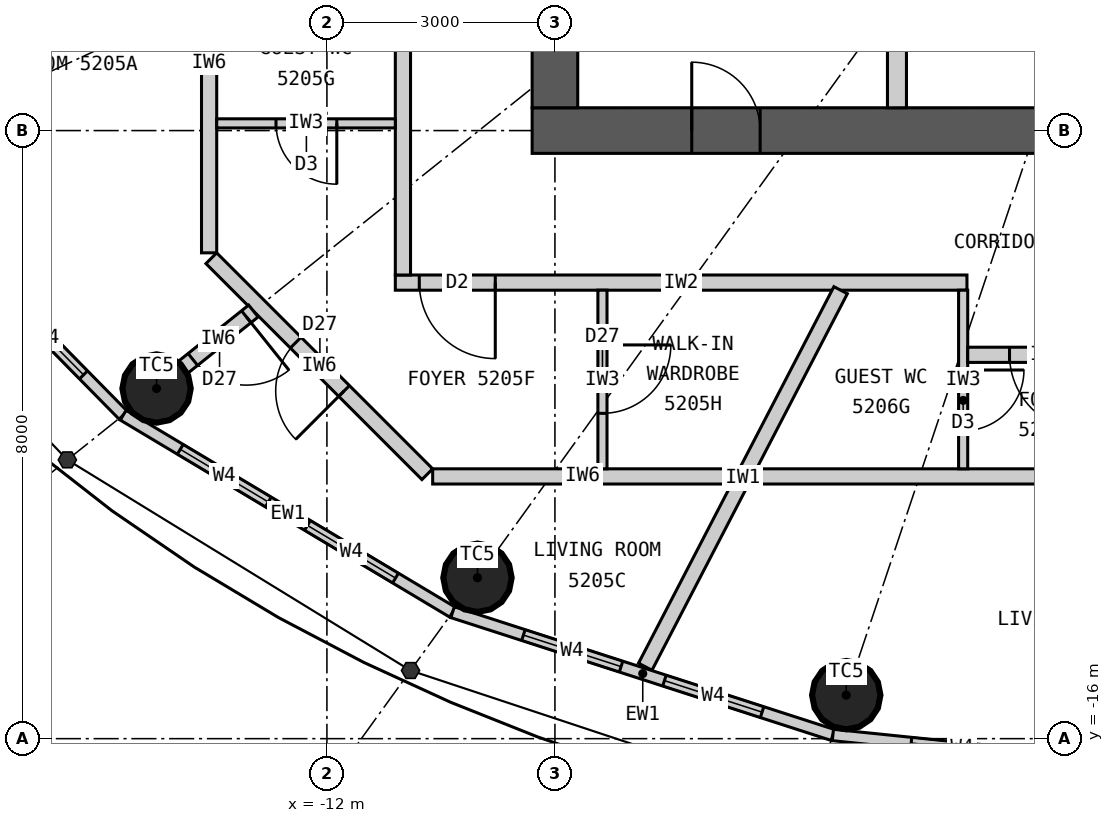
"""IFC4 building model, lengths in metres.
Left out: names, types, materials, properties, quantities, classifications, styles, units other than length and angle.
Written with IfcOpenShell. Run it as: python <this file> out.ifc"""

import sys

from ifc_helpers import new_model, si_unit, direction, frame, frame_2d, origin, origin_2d, place, context, subcontext, project, spatial, rectangle, circle, extrude, element, fill, save


model = new_model("IFC4")
c1 = context("Model", 3, precision=1e-05, world=origin(), true_north=direction((0.0, 1.0)))
c2 = subcontext(c1, "Body", "Model", "MODEL_VIEW")
j1 = project(units=[si_unit("LENGTHUNIT", "METRE"), si_unit("PLANEANGLEUNIT", "RADIAN")], contexts=[c1])
p1 = place(None, origin())
s1 = spatial("IfcSite", under=j1, at=p1, CompositionType="ELEMENT")
p2 = place(p1, origin())
s2 = spatial("IfcBuilding", under=s1, at=p2, CompositionType="ELEMENT")
p3 = place(p2, frame((0.0, 0.0, 196.2)))
s3 = spatial("IfcBuildingStorey", under=s2, at=p3, CompositionType="ELEMENT", Elevation=196.2)
for number, where, z_axis, x_axis in (
    (1, (-14.241, -11.393, 0.0), (0.0, 0.0, 1.0), (1.0, 0.0, 0.0)),
    (2, (-10.019, -13.883, 0.0), (0.0, 0.0, 1.0), (1.0, 0.0, 0.0)),
    (3, (-5.167, -15.427, 0.0), (0.0, 0.0, 1.0), (1.0, 0.0, 0.0)),
):
    element("IfcColumn", number, at=place(p3, frame(where, z_axis=z_axis, x_axis=x_axis)), inside=s3, PredefinedType="COLUMN", context=c2, shape_type="SweptSolid", body=[
        extrude(circle(Radius=0.45, at=origin_2d()), origin(), (0.0, 0.0, 1.0), 3.3),
    ])
p4 = place(p3, frame((9.3, -8.0, 0.0), z_axis=(0.0, 0.0, 1.0), x_axis=(-1.0, 0.0, 0.0)))
e4 = element("IfcWall", 4, at=p4, inside=s3, PredefinedType="SHEAR", context=c2, shape_type="SweptSolid", body=[
    extrude(rectangle(XDim=18.6, YDim=0.6, at=frame_2d((9.3, 0.0))), origin(), (0.0, 0.0, 1.0), 3.3),
])
p5 = place(p4, frame((8.0, 0.0, 0.0)))
e5 = element("IfcOpeningElement", 5, at=p5, cuts=e4, PredefinedType="OPENING", context=c2, shape_type="SweptSolid", body=[
    extrude(rectangle(XDim=1.2, YDim=2.2, at=frame_2d((0.6, 1.1))), frame((0.0, 0.31, 0.0), z_axis=(0.0, -1.0, 0.0), x_axis=(1.0, 0.0, 0.0)), (0.0, 0.0, 1.0), 0.62),
])
p6 = place(p4, frame((15.6, 0.0, 0.0)))
e6 = element("IfcOpeningElement", 6, at=p6, cuts=e4, PredefinedType="OPENING", context=c2, shape_type="SweptSolid", body=[
    extrude(rectangle(XDim=0.9, YDim=2.2, at=frame_2d((0.45, 1.1))), frame((0.0, 0.31, 0.0), z_axis=(0.0, -1.0, 0.0), x_axis=(1.0, 0.0, 0.0)), (0.0, 0.0, 1.0), 0.62),
])
p7 = place(p3, frame((-9.0, 7.7, 0.0), z_axis=(0.0, 0.0, 1.0), x_axis=(0.0, -1.0, 0.0)))
e7 = element("IfcWall", 7, at=p7, inside=s3, PredefinedType="SHEAR", context=c2, shape_type="SweptSolid", body=[
    extrude(rectangle(XDim=15.4, YDim=0.6, at=frame_2d((7.7, 0.0))), origin(), (0.0, 0.0, 1.0), 3.3),
])
p8 = place(p7, frame((6.8, 0.0, 0.0)))
e8 = element("IfcOpeningElement", 8, at=p8, cuts=e7, PredefinedType="OPENING", context=c2, shape_type="SweptSolid", body=[
    extrude(rectangle(XDim=1.8, YDim=2.2, at=frame_2d((0.9, 1.1))), frame((0.0, 0.31, 0.0), z_axis=(0.0, -1.0, 0.0), x_axis=(1.0, 0.0, 0.0)), (0.0, 0.0, 1.0), 0.62),
])
p9 = place(p3, frame((-4.5, -7.7, 0.0), z_axis=(0.0, 0.0, 1.0), x_axis=(0.0, 1.0, 0.0)))
e9 = element("IfcWall", 9, at=p9, inside=s3, PredefinedType="PARTITIONING", context=c2, shape_type="SweptSolid", body=[
    extrude(rectangle(XDim=3.2, YDim=0.25, at=frame_2d((1.6, 0.0))), origin(), (0.0, 0.0, 1.0), 3.3),
])
p10 = place(p3, frame((-18.04, -8.332, 0.0), z_axis=(0.0, 0.0, 1.0), x_axis=(0.701527379618, -0.712642501993, 0.0)))
e10 = element("IfcWall", 10, at=p10, inside=s3, PredefinedType="ELEMENTEDWALL", context=c2, shape_type="SweptSolid", body=[
    extrude(rectangle(XDim=4.788, YDim=0.15, at=frame_2d((2.394, 0.0))), origin(), (0.0, 0.0, 1.0), 3.12),
])
p11 = place(p10, frame((0.744, 0.0, 0.9)))
e11 = element("IfcOpeningElement", 11, at=p11, cuts=e10, PredefinedType="OPENING", context=c2, shape_type="SweptSolid", body=[
    extrude(rectangle(XDim=1.35, YDim=1.9, at=frame_2d((0.675, 0.95))), frame((0.0, 0.085, 0.0), z_axis=(0.0, -1.0, 0.0), x_axis=(1.0, 0.0, 0.0)), (0.0, 0.0, 1.0), 0.17),
])
p12 = place(p10, frame((2.694, 0.0, 0.9)))
e12 = element("IfcOpeningElement", 12, at=p12, cuts=e10, PredefinedType="OPENING", context=c2, shape_type="SweptSolid", body=[
    extrude(rectangle(XDim=1.35, YDim=1.9, at=frame_2d((0.675, 0.95))), frame((0.0, 0.085, 0.0), z_axis=(0.0, -1.0, 0.0), x_axis=(1.0, 0.0, 0.0)), (0.0, 0.0, 1.0), 0.17),
])
p13 = place(p3, frame((-14.68, -11.744, 0.0), z_axis=(0.0, 0.0, 1.0), x_axis=(0.85822150553, -0.513279502265, 0.0)))
e13 = element("IfcWall", 13, at=p13, inside=s3, PredefinedType="ELEMENTEDWALL", context=c2, shape_type="SweptSolid", body=[
    extrude(rectangle(XDim=5.05, YDim=0.15, at=frame_2d((2.525, 0.0))), origin(), (0.0, 0.0, 1.0), 3.12),
])
p14 = place(p13, frame((0.875, 0.0, 0.9)))
e14 = element("IfcOpeningElement", 14, at=p14, cuts=e13, PredefinedType="OPENING", context=c2, shape_type="SweptSolid", body=[
    extrude(rectangle(XDim=1.35, YDim=1.9, at=frame_2d((0.675, 0.95))), frame((0.0, 0.085, 0.0), z_axis=(0.0, -1.0, 0.0), x_axis=(1.0, 0.0, 0.0)), (0.0, 0.0, 1.0), 0.17),
])
p15 = place(p13, frame((2.825, 0.0, 0.9)))
e15 = element("IfcOpeningElement", 15, at=p15, cuts=e13, PredefinedType="OPENING", context=c2, shape_type="SweptSolid", body=[
    extrude(rectangle(XDim=1.35, YDim=1.9, at=frame_2d((0.675, 0.95))), frame((0.0, 0.085, 0.0), z_axis=(0.0, -1.0, 0.0), x_axis=(1.0, 0.0, 0.0)), (0.0, 0.0, 1.0), 0.17),
])
p16 = place(p3, frame((-10.346, -14.336, 0.0), z_axis=(0.0, 0.0, 1.0), x_axis=(0.951644702515, -0.307200846638, 0.0)))
e16 = element("IfcWall", 16, at=p16, inside=s3, PredefinedType="ELEMENTEDWALL", context=c2, shape_type="SweptSolid", body=[
    extrude(rectangle(XDim=5.258, YDim=0.15, at=frame_2d((2.629, 0.0))), origin(), (0.0, 0.0, 1.0), 3.12),
])
p17 = place(p16, frame((0.979, 0.0, 0.9)))
e17 = element("IfcOpeningElement", 17, at=p17, cuts=e16, PredefinedType="OPENING", context=c2, shape_type="SweptSolid", body=[
    extrude(rectangle(XDim=1.35, YDim=1.9, at=frame_2d((0.675, 0.95))), frame((0.0, 0.085, 0.0), z_axis=(0.0, -1.0, 0.0), x_axis=(1.0, 0.0, 0.0)), (0.0, 0.0, 1.0), 0.17),
])
p18 = place(p16, frame((2.929, 0.0, 0.9)))
e18 = element("IfcOpeningElement", 18, at=p18, cuts=e16, PredefinedType="OPENING", context=c2, shape_type="SweptSolid", body=[
    extrude(rectangle(XDim=1.35, YDim=1.9, at=frame_2d((0.675, 0.95))), frame((0.0, 0.085, 0.0), z_axis=(0.0, -1.0, 0.0), x_axis=(1.0, 0.0, 0.0)), (0.0, 0.0, 1.0), 0.17),
])
p19 = place(p3, frame((-5.343, -15.952, 0.0), z_axis=(0.0, 0.0, 1.0), x_axis=(0.994774574972, -0.102095763818, 0.0)))
e19 = element("IfcWall", 19, at=p19, inside=s3, PredefinedType="ELEMENTEDWALL", context=c2, shape_type="SweptSolid", body=[
    extrude(rectangle(XDim=5.371, YDim=0.15, at=frame_2d((2.686, 0.0))), origin(), (0.0, 0.0, 1.0), 3.12),
])
p20 = place(p19, frame((1.035, 0.0, 0.9)))
e20 = element("IfcOpeningElement", 20, at=p20, cuts=e19, PredefinedType="OPENING", context=c2, shape_type="SweptSolid", body=[
    extrude(rectangle(XDim=1.35, YDim=1.9, at=frame_2d((0.675, 0.95))), frame((0.0, 0.085, 0.0), z_axis=(0.0, -1.0, 0.0), x_axis=(1.0, 0.0, 0.0)), (0.0, 0.0, 1.0), 0.17),
])
p21 = place(p19, frame((2.985, 0.0, 0.9)))
e21 = element("IfcOpeningElement", 21, at=p21, cuts=e19, PredefinedType="OPENING", context=c2, shape_type="SweptSolid", body=[
    extrude(rectangle(XDim=1.35, YDim=1.9, at=frame_2d((0.675, 0.95))), frame((0.0, 0.085, 0.0), z_axis=(0.0, -1.0, 0.0), x_axis=(1.0, 0.0, 0.0)), (0.0, 0.0, 1.0), 0.17),
])
p22 = place(p3, frame((-3.579, -10.0, 0.0), z_axis=(0.0, 0.0, 1.0), x_axis=(-1.0, 0.0, 0.0)))
e22 = element("IfcWall", 22, at=p22, inside=s3, PredefinedType="PARTITIONING", context=c2, shape_type="SweptSolid", body=[
    extrude(rectangle(XDim=7.521, YDim=0.2, at=frame_2d((3.761, 0.0))), origin(), (0.0, 0.0, 1.0), 3.12),
])
p23 = place(p22, frame((6.206, 0.0, 0.0)))
e23 = element("IfcOpeningElement", 23, at=p23, cuts=e22, PredefinedType="OPENING", context=c2, shape_type="SweptSolid", body=[
    extrude(rectangle(XDim=1.0, YDim=2.2, at=frame_2d((0.5, 1.1))), frame((0.0, 0.11, 0.0), z_axis=(0.0, -1.0, 0.0), x_axis=(1.0, 0.0, 0.0)), (0.0, 0.0, 1.0), 0.22),
])
p24 = place(p3, frame((-11.0, 0.464, 0.0), z_axis=(0.0, 0.0, 1.0), x_axis=(0.0, -1.0, 0.0)))
e24 = element("IfcWall", 24, at=p24, inside=s3, PredefinedType="PARTITIONING", context=c2, shape_type="SweptSolid", body=[
    extrude(rectangle(XDim=10.364, YDim=0.2, at=frame_2d((5.182, 0.0))), origin(), (0.0, 0.0, 1.0), 3.12),
])
p25 = place(p3, frame((-5.241, -10.1, 0.0), z_axis=(0.0, 0.0, 1.0), x_axis=(-0.460603196597, -0.887606160008, 0.0)))
e25 = element("IfcWall", 25, at=p25, inside=s3, PredefinedType="PARTITIONING", context=c2, shape_type="SweptSolid", body=[
    extrude(rectangle(XDim=5.58, YDim=0.2, at=frame_2d((2.79, 0.0))), origin(), (0.0, 0.0, 1.0), 3.12),
])
p26 = place(p3, frame((-13.55, -4.6, 0.0), z_axis=(0.0, 0.0, 1.0), x_axis=(0.0, -1.0, 0.0)))
e26 = element("IfcWall", 26, at=p26, inside=s3, PredefinedType="PARTITIONING", context=c2, shape_type="SweptSolid", body=[
    extrude(rectangle(XDim=5.009, YDim=0.2, at=frame_2d((2.504, 0.0))), origin(), (0.0, 0.0, 1.0), 3.12),
])
p27 = place(p26, frame((0.774, 0.0, 0.0)))
e27 = element("IfcOpeningElement", 27, at=p27, cuts=e26, PredefinedType="OPENING", context=c2, shape_type="SweptSolid", body=[
    extrude(rectangle(XDim=0.8, YDim=2.1, at=frame_2d((0.4, 1.05))), frame((0.0, 0.11, 0.0), z_axis=(0.0, -1.0, 0.0), x_axis=(1.0, 0.0, 0.0)), (0.0, 0.0, 1.0), 0.22),
])
p28 = place(p3, frame((-13.521, -9.679, 0.0), z_axis=(0.0, 0.0, 1.0), x_axis=(0.707106781187, -0.707106781187, 0.0)))
e28 = element("IfcWall", 28, at=p28, inside=s3, PredefinedType="PARTITIONING", context=c2, shape_type="SweptSolid", body=[
    extrude(rectangle(XDim=4.019, YDim=0.2, at=frame_2d((2.009, 0.0))), origin(), (0.0, 0.0, 1.0), 3.12),
])
p29 = place(p28, frame((1.57, 0.0, 0.0)))
e29 = element("IfcOpeningElement", 29, at=p29, cuts=e28, PredefinedType="OPENING", context=c2, shape_type="SweptSolid", body=[
    extrude(rectangle(XDim=0.9, YDim=2.1, at=frame_2d((0.45, 1.05))), frame((0.0, 0.11, 0.0), z_axis=(0.0, -1.0, 0.0), x_axis=(1.0, 0.0, 0.0)), (0.0, 0.0, 1.0), 0.22),
])
p30 = place(p3, frame((-10.609, -12.55, 0.0), z_axis=(0.0, 0.0, 1.0), x_axis=(1.0, 0.0, 0.0)))
e30 = element("IfcWall", 30, at=p30, inside=s3, PredefinedType="PARTITIONING", context=c2, shape_type="SweptSolid", body=[
    extrude(rectangle(XDim=3.947, YDim=0.2, at=frame_2d((1.974, 0.0))), origin(), (0.0, 0.0, 1.0), 3.12),
])
p31 = place(p3, frame((-12.968, -10.374, 0.0), z_axis=(0.0, 0.0, 1.0), x_axis=(-0.780888968944, -0.624669847345, 0.0)))
e31 = element("IfcWall", 31, at=p31, inside=s3, PredefinedType="PARTITIONING", context=c2, shape_type="SweptSolid", body=[
    extrude(rectangle(XDim=1.181, YDim=0.2, at=frame_2d((0.591, 0.0))), origin(), (0.0, 0.0, 1.0), 2.42),
])
p32 = place(p31, frame((0.12, 0.0, 0.0)))
e32 = element("IfcOpeningElement", 32, at=p32, cuts=e31, PredefinedType="OPENING", context=c2, shape_type="SweptSolid", body=[
    extrude(rectangle(XDim=0.9, YDim=2.1, at=frame_2d((0.45, 1.05))), frame((0.0, 0.11, 0.0), z_axis=(0.0, -1.0, 0.0), x_axis=(1.0, 0.0, 0.0)), (0.0, 0.0, 1.0), 0.22),
])
p33 = place(p3, frame((-11.1, -7.905, 0.0), z_axis=(0.0, 0.0, 1.0), x_axis=(-1.0, 0.0, 0.0)))
e33 = element("IfcWall", 33, at=p33, inside=s3, PredefinedType="PARTITIONING", context=c2, shape_type="SweptSolid", body=[
    extrude(rectangle(XDim=2.35, YDim=0.12, at=frame_2d((1.175, 0.0))), origin(), (0.0, 0.0, 1.0), 3.12),
])
p34 = place(p33, frame((0.77, 0.0, 0.0)))
e34 = element("IfcOpeningElement", 34, at=p34, cuts=e33, PredefinedType="OPENING", context=c2, shape_type="SweptSolid", body=[
    extrude(rectangle(XDim=0.8, YDim=2.1, at=frame_2d((0.4, 1.05))), frame((0.0, 0.07, 0.0), z_axis=(0.0, -1.0, 0.0), x_axis=(1.0, 0.0, 0.0)), (0.0, 0.0, 1.0), 0.14),
])
p35 = place(p3, frame((-8.375, -10.1, 0.0), z_axis=(0.0, 0.0, 1.0), x_axis=(0.0, -1.0, 0.0)))
e35 = element("IfcWall", 35, at=p35, inside=s3, PredefinedType="PARTITIONING", context=c2, shape_type="SweptSolid", body=[
    extrude(rectangle(XDim=2.35, YDim=0.12, at=frame_2d((1.175, 0.0))), origin(), (0.0, 0.0, 1.0), 3.12),
])
p36 = place(p35, frame((0.72, 0.0, 0.0)))
e36 = element("IfcOpeningElement", 36, at=p36, cuts=e35, PredefinedType="OPENING", context=c2, shape_type="SweptSolid", body=[
    extrude(rectangle(XDim=0.9, YDim=2.1, at=frame_2d((0.45, 1.05))), frame((0.0, 0.07, 0.0), z_axis=(0.0, -1.0, 0.0), x_axis=(1.0, 0.0, 0.0)), (0.0, 0.0, 1.0), 0.14),
])
p37 = place(p3, frame((-6.364, -12.55, 0.0), z_axis=(0.0, 0.0, 1.0), x_axis=(1.0, 0.0, 0.0)))
e37 = element("IfcWall", 37, at=p37, inside=s3, PredefinedType="PARTITIONING", context=c2, shape_type="SweptSolid", body=[
    extrude(rectangle(XDim=10.446, YDim=0.2, at=frame_2d((5.223, 0.0))), origin(), (0.0, 0.0, 1.0), 3.12),
])
p38 = place(p37, frame((7.202, 0.0, 0.0)))
e38 = element("IfcOpeningElement", 38, at=p38, cuts=e37, PredefinedType="OPENING", context=c2, shape_type="SweptSolid", body=[
    extrude(rectangle(XDim=0.8, YDim=2.1, at=frame_2d((0.4, 1.05))), frame((0.0, 0.11, 0.0), z_axis=(0.0, -1.0, 0.0), x_axis=(1.0, 0.0, 0.0)), (0.0, 0.0, 1.0), 0.22),
])
p39 = place(p37, frame((3.895, 0.0, 0.0)))
e39 = element("IfcOpeningElement", 39, at=p39, cuts=e37, PredefinedType="OPENING", context=c2, shape_type="SweptSolid", body=[
    extrude(rectangle(XDim=0.9, YDim=2.1, at=frame_2d((0.45, 1.05))), frame((0.0, 0.11, 0.0), z_axis=(0.0, -1.0, 0.0), x_axis=(1.0, 0.0, 0.0)), (0.0, 0.0, 1.0), 0.22),
])
p40 = place(p3, frame((-3.629, -10.1, 0.0), z_axis=(0.0, 0.0, 1.0), x_axis=(0.0, -1.0, 0.0)))
e40 = element("IfcWall", 40, at=p40, inside=s3, PredefinedType="PARTITIONING", context=c2, shape_type="SweptSolid", body=[
    extrude(rectangle(XDim=2.35, YDim=0.12, at=frame_2d((1.175, 0.0))), origin(), (0.0, 0.0, 1.0), 3.12),
])
p41 = place(p40, frame((1.05, 0.0, 0.0)))
e41 = element("IfcOpeningElement", 41, at=p41, cuts=e40, PredefinedType="OPENING", context=c2, shape_type="SweptSolid", body=[
    extrude(rectangle(XDim=0.8, YDim=2.1, at=frame_2d((0.4, 1.05))), frame((0.0, 0.07, 0.0), z_axis=(0.0, -1.0, 0.0), x_axis=(1.0, 0.0, 0.0)), (0.0, 0.0, 1.0), 0.14),
])
p42 = place(p3, frame((-3.569, -10.95, 0.0), z_axis=(0.0, 0.0, 1.0), x_axis=(1.0, 0.0, 0.0)))
e42 = element("IfcWall", 42, at=p42, inside=s3, PredefinedType="PARTITIONING", context=c2, shape_type="SweptSolid", body=[
    extrude(rectangle(XDim=2.1, YDim=0.2, at=frame_2d((1.05, 0.0))), origin(), (0.0, 0.0, 1.0), 3.12),
])
p43 = place(p42, frame((0.55, 0.0, 0.0)))
e43 = element("IfcOpeningElement", 43, at=p43, cuts=e42, PredefinedType="OPENING", context=c2, shape_type="SweptSolid", body=[
    extrude(rectangle(XDim=1.0, YDim=2.2, at=frame_2d((0.5, 1.1))), frame((0.0, 0.11, 0.0), z_axis=(0.0, -1.0, 0.0), x_axis=(1.0, 0.0, 0.0)), (0.0, 0.0, 1.0), 0.22),
])
p44 = place(p12, origin())
e44 = element("IfcWindow", 44, at=p44, inside=s3, PartitioningType="SINGLE_PANEL", PredefinedType="WINDOW", context=c2, shape_type="SweptSolid", body=[
    extrude(rectangle(XDim=1.35, YDim=1.9, at=frame_2d((0.675, 0.95))), frame((0.0, 0.03, 0.0), z_axis=(0.0, -1.0, 0.0), x_axis=(1.0, 0.0, 0.0)), (0.0, 0.0, 1.0), 0.06),
])
fill(e12, e44)
p45 = place(p14, origin())
e45 = element("IfcWindow", 45, at=p45, inside=s3, PartitioningType="SINGLE_PANEL", PredefinedType="WINDOW", context=c2, shape_type="SweptSolid", body=[
    extrude(rectangle(XDim=1.35, YDim=1.9, at=frame_2d((0.675, 0.95))), frame((0.0, 0.03, 0.0), z_axis=(0.0, -1.0, 0.0), x_axis=(1.0, 0.0, 0.0)), (0.0, 0.0, 1.0), 0.06),
])
fill(e14, e45)
p46 = place(p15, origin())
e46 = element("IfcWindow", 46, at=p46, inside=s3, PartitioningType="SINGLE_PANEL", PredefinedType="WINDOW", context=c2, shape_type="SweptSolid", body=[
    extrude(rectangle(XDim=1.35, YDim=1.9, at=frame_2d((0.675, 0.95))), frame((0.0, 0.03, 0.0), z_axis=(0.0, -1.0, 0.0), x_axis=(1.0, 0.0, 0.0)), (0.0, 0.0, 1.0), 0.06),
])
fill(e15, e46)
p47 = place(p17, origin())
e47 = element("IfcWindow", 47, at=p47, inside=s3, PartitioningType="SINGLE_PANEL", PredefinedType="WINDOW", context=c2, shape_type="SweptSolid", body=[
    extrude(rectangle(XDim=1.35, YDim=1.9, at=frame_2d((0.675, 0.95))), frame((0.0, 0.03, 0.0), z_axis=(0.0, -1.0, 0.0), x_axis=(1.0, 0.0, 0.0)), (0.0, 0.0, 1.0), 0.06),
])
fill(e17, e47)
p48 = place(p18, origin())
e48 = element("IfcWindow", 48, at=p48, inside=s3, PartitioningType="SINGLE_PANEL", PredefinedType="WINDOW", context=c2, shape_type="SweptSolid", body=[
    extrude(rectangle(XDim=1.35, YDim=1.9, at=frame_2d((0.675, 0.95))), frame((0.0, 0.03, 0.0), z_axis=(0.0, -1.0, 0.0), x_axis=(1.0, 0.0, 0.0)), (0.0, 0.0, 1.0), 0.06),
])
fill(e18, e48)
p49 = place(p20, origin())
e49 = element("IfcWindow", 49, at=p49, inside=s3, PartitioningType="SINGLE_PANEL", PredefinedType="WINDOW", context=c2, shape_type="SweptSolid", body=[
    extrude(rectangle(XDim=1.35, YDim=1.9, at=frame_2d((0.675, 0.95))), frame((0.0, 0.03, 0.0), z_axis=(0.0, -1.0, 0.0), x_axis=(1.0, 0.0, 0.0)), (0.0, 0.0, 1.0), 0.06),
])
fill(e20, e49)
p50 = place(p23, origin())
e50 = element("IfcDoor", 50, at=p50, inside=s3, OperationType="SINGLE_SWING_LEFT", PredefinedType="DOOR", context=c2, shape_type="SweptSolid", body=[
    extrude(rectangle(XDim=1.0, YDim=2.2, at=frame_2d((0.5, 1.1))), frame((0.0, 0.025, 0.0), z_axis=(0.0, -1.0, 0.0), x_axis=(1.0, 0.0, 0.0)), (0.0, 0.0, 1.0), 0.05),
])
fill(e23, e50)
p51 = place(p34, origin())
e51 = element("IfcDoor", 51, at=p51, inside=s3, OperationType="SINGLE_SWING_LEFT", PredefinedType="DOOR", context=c2, shape_type="SweptSolid", body=[
    extrude(rectangle(XDim=0.8, YDim=2.1, at=frame_2d((0.4, 1.05))), frame((0.0, 0.025, 0.0), z_axis=(0.0, -1.0, 0.0), x_axis=(1.0, 0.0, 0.0)), (0.0, 0.0, 1.0), 0.05),
])
fill(e34, e51)
p52 = place(p36, origin())
e52 = element("IfcDoor", 52, at=p52, inside=s3, OperationType="SINGLE_SWING_LEFT", PredefinedType="DOOR", context=c2, shape_type="SweptSolid", body=[
    extrude(rectangle(XDim=0.9, YDim=2.1, at=frame_2d((0.45, 1.05))), frame((0.0, 0.025, 0.0), z_axis=(0.0, -1.0, 0.0), x_axis=(1.0, 0.0, 0.0)), (0.0, 0.0, 1.0), 0.05),
])
fill(e36, e52)
p53 = place(p29, origin())
e53 = element("IfcDoor", 53, at=p53, inside=s3, OperationType="SINGLE_SWING_RIGHT", PredefinedType="DOOR", context=c2, shape_type="SweptSolid", body=[
    extrude(rectangle(XDim=0.9, YDim=2.1, at=frame_2d((0.45, 1.05))), frame((0.0, 0.025, 0.0), z_axis=(0.0, -1.0, 0.0), x_axis=(1.0, 0.0, 0.0)), (0.0, 0.0, 1.0), 0.05),
])
fill(e29, e53)
p54 = place(p32, origin())
e54 = element("IfcDoor", 54, at=p54, inside=s3, OperationType="SINGLE_SWING_LEFT", PredefinedType="DOOR", context=c2, shape_type="SweptSolid", body=[
    extrude(rectangle(XDim=0.9, YDim=2.1, at=frame_2d((0.45, 1.05))), frame((0.0, 0.025, 0.0), z_axis=(0.0, -1.0, 0.0), x_axis=(1.0, 0.0, 0.0)), (0.0, 0.0, 1.0), 0.05),
])
fill(e32, e54)
p55 = place(p43, origin())
e55 = element("IfcDoor", 55, at=p55, inside=s3, OperationType="SINGLE_SWING_RIGHT", PredefinedType="DOOR", context=c2, shape_type="SweptSolid", body=[
    extrude(rectangle(XDim=1.0, YDim=2.2, at=frame_2d((0.5, 1.1))), frame((0.0, 0.025, 0.0), z_axis=(0.0, -1.0, 0.0), x_axis=(1.0, 0.0, 0.0)), (0.0, 0.0, 1.0), 0.05),
])
fill(e43, e55)
p56 = place(p41, origin())
e56 = element("IfcDoor", 56, at=p56, inside=s3, OperationType="SINGLE_SWING_LEFT", PredefinedType="DOOR", context=c2, shape_type="SweptSolid", body=[
    extrude(rectangle(XDim=0.8, YDim=2.1, at=frame_2d((0.4, 1.05))), frame((0.0, 0.025, 0.0), z_axis=(0.0, -1.0, 0.0), x_axis=(1.0, 0.0, 0.0)), (0.0, 0.0, 1.0), 0.05),
])
fill(e41, e56)
p57 = place(p6, origin())
e57 = element("IfcDoor", 57, at=p57, inside=s3, OperationType="SINGLE_SWING_RIGHT", PredefinedType="DOOR", context=c2, shape_type="SweptSolid", body=[
    extrude(rectangle(XDim=0.9, YDim=2.2, at=frame_2d((0.45, 1.1))), frame((0.0, 0.025, 0.0), z_axis=(0.0, -1.0, 0.0), x_axis=(1.0, 0.0, 0.0)), (0.0, 0.0, 1.0), 0.05),
])
fill(e6, e57)
save(model, sys.argv[1])
